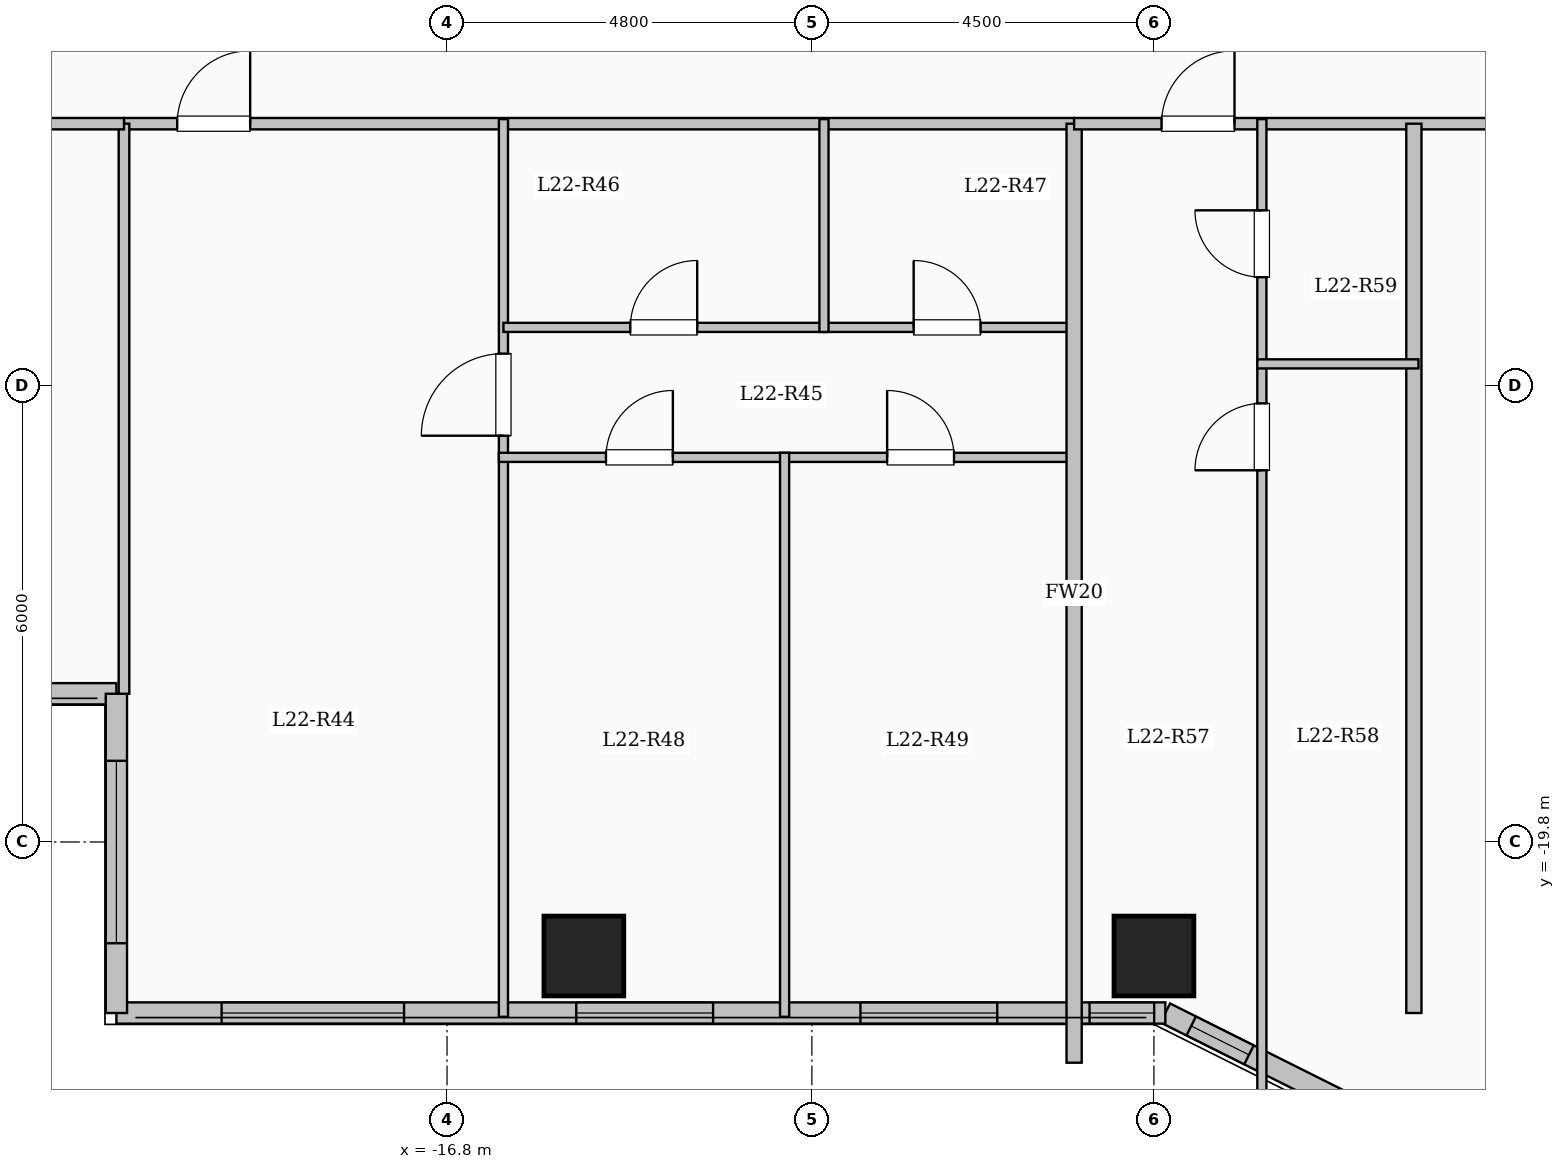
"""IFC4 building model, lengths in metres.
Left out: names, types, materials, properties, quantities, classifications, styles, units other than length and angle.
Written with IfcOpenShell. Run it as: python <this file> out.ifc"""

import sys

from ifc_helpers import new_model, si_unit, direction, frame, frame_2d, origin, origin_2d, place, context, subcontext, project, spatial, rectangle, extrude, element, fill, save


model = new_model("IFC4")
c1 = context("Model", 3, precision=1e-05, world=origin(), true_north=direction((0.0, 1.0)))
c2 = subcontext(c1, "Body", "Model", "MODEL_VIEW")
j1 = project(units=[si_unit("LENGTHUNIT", "METRE"), si_unit("PLANEANGLEUNIT", "RADIAN")], contexts=[c1])
p1 = place(None, origin())
s1 = spatial("IfcSite", under=j1, at=p1, CompositionType="ELEMENT")
p2 = place(p1, origin())
s2 = spatial("IfcBuilding", under=s1, at=p2, CompositionType="ELEMENT")
p3 = place(p2, frame((0.0, 0.0, 85.0)))
s3 = spatial("IfcBuildingStorey", under=s2, at=p3, CompositionType="ELEMENT", Elevation=85.0)
for number, where, z_axis, x_axis in (
    (1, (-15.0, -21.3, 0.0), (0.0, 0.0, 1.0), (1.0, 0.0, 0.0)),
    (2, (-7.5, -21.3, 0.0), (0.0, 0.0, 1.0), (1.0, 0.0, 0.0)),
):
    element("IfcColumn", number, at=place(p3, frame(where, z_axis=z_axis, x_axis=x_axis)), inside=s3, PredefinedType="COLUMN", context=c2, shape_type="SweptSolid", body=[
        extrude(rectangle(XDim=1.05, YDim=1.05, at=origin_2d()), origin(), (0.0, 0.0, 1.0), 3.35),
    ])
p4 = place(p3, frame((-21.15, -17.85, 0.0), z_axis=(0.0, 0.0, 1.0), x_axis=(-1.0, 0.0, 0.0)))
e3 = element("IfcWall", 3, at=p4, inside=s3, PredefinedType="SOLIDWALL", context=c2, shape_type="SweptSolid", body=[
    extrude(rectangle(XDim=5.7, YDim=0.28, at=frame_2d((2.85, 0.0))), origin(), (0.0, 0.0, 1.0), 3.1),
])
p5 = place(p4, frame((1.625, 0.0, 0.9)))
e4 = element("IfcOpeningElement", 4, at=p5, cuts=e3, PredefinedType="OPENING", context=c2, shape_type="SweptSolid", body=[
    extrude(rectangle(XDim=2.4, YDim=1.8, at=frame_2d((1.2, 0.9))), frame((0.0, 0.15, 0.0), z_axis=(0.0, -1.0, 0.0), x_axis=(1.0, 0.0, 0.0)), (0.0, 0.0, 1.0), 0.3),
])
p6 = place(p3, frame((-4.35, -23.55, 0.0), z_axis=(0.0, 0.0, 1.0), x_axis=(-0.894427191, 0.4472135955, 0.0)))
e5 = element("IfcWall", 5, at=p6, inside=s3, PredefinedType="SOLIDWALL", context=c2, shape_type="SweptSolid", body=[
    extrude(rectangle(XDim=3.354, YDim=0.28, at=frame_2d((1.677, 0.0))), origin(), (0.0, 0.0, 1.0), 3.1),
])
p7 = place(p6, frame((2.124, 0.0, 0.95)))
e6 = element("IfcOpeningElement", 6, at=p7, cuts=e5, PredefinedType="OPENING", context=c2, shape_type="SweptSolid", body=[
    extrude(rectangle(XDim=0.85, YDim=1.5, at=frame_2d((0.425, 0.75))), frame((0.0, 0.15, 0.0), z_axis=(0.0, -1.0, 0.0), x_axis=(1.0, 0.0, 0.0)), (0.0, 0.0, 1.0), 0.3),
])
p8 = place(p3, frame((-7.35, -22.05, 0.0), z_axis=(0.0, 0.0, 1.0), x_axis=(-1.0, 0.0, 0.0)))
e7 = element("IfcWall", 7, at=p8, inside=s3, PredefinedType="SOLIDWALL", context=c2, shape_type="SweptSolid", body=[
    extrude(rectangle(XDim=13.8, YDim=0.28, at=frame_2d((6.9, 0.0))), origin(), (0.0, 0.0, 1.0), 3.1),
])
p9 = place(p8, frame((0.147, 0.0, 0.95)))
e8 = element("IfcOpeningElement", 8, at=p9, cuts=e7, PredefinedType="OPENING", context=c2, shape_type="SweptSolid", body=[
    extrude(rectangle(XDim=0.85, YDim=1.5, at=frame_2d((0.425, 0.75))), frame((0.0, 0.15, 0.0), z_axis=(0.0, -1.0, 0.0), x_axis=(1.0, 0.0, 0.0)), (0.0, 0.0, 1.0), 0.3),
])
p10 = place(p8, frame((2.211, 0.0, 0.9)))
e9 = element("IfcOpeningElement", 9, at=p10, cuts=e7, PredefinedType="OPENING", context=c2, shape_type="SweptSolid", body=[
    extrude(rectangle(XDim=1.8, YDim=1.65, at=frame_2d((0.9, 0.825))), frame((0.0, 0.15, 0.0), z_axis=(0.0, -1.0, 0.0), x_axis=(1.0, 0.0, 0.0)), (0.0, 0.0, 1.0), 0.3),
])
p11 = place(p8, frame((5.95, 0.0, 0.9)))
e10 = element("IfcOpeningElement", 10, at=p11, cuts=e7, PredefinedType="OPENING", context=c2, shape_type="SweptSolid", body=[
    extrude(rectangle(XDim=1.8, YDim=1.65, at=frame_2d((0.9, 0.825))), frame((0.0, 0.15, 0.0), z_axis=(0.0, -1.0, 0.0), x_axis=(1.0, 0.0, 0.0)), (0.0, 0.0, 1.0), 0.3),
])
p12 = place(p8, frame((10.016, 0.0, 0.9)))
e11 = element("IfcOpeningElement", 11, at=p12, cuts=e7, PredefinedType="OPENING", context=c2, shape_type="SweptSolid", body=[
    extrude(rectangle(XDim=2.4, YDim=1.8, at=frame_2d((1.2, 0.9))), frame((0.0, 0.15, 0.0), z_axis=(0.0, -1.0, 0.0), x_axis=(1.0, 0.0, 0.0)), (0.0, 0.0, 1.0), 0.3),
])
p13 = place(p3, frame((-21.15, -22.05, 0.0), z_axis=(0.0, 0.0, 1.0), x_axis=(0.0, 1.0, 0.0)))
e12 = element("IfcWall", 12, at=p13, inside=s3, PredefinedType="SOLIDWALL", context=c2, shape_type="SweptSolid", body=[
    extrude(rectangle(XDim=4.2, YDim=0.28, at=frame_2d((2.1, 0.0))), origin(), (0.0, 0.0, 1.0), 3.1),
])
p14 = place(p13, frame((0.918, 0.0, 0.9)))
e13 = element("IfcOpeningElement", 13, at=p14, cuts=e12, PredefinedType="OPENING", context=c2, shape_type="SweptSolid", body=[
    extrude(rectangle(XDim=2.4, YDim=1.8, at=frame_2d((1.2, 0.9))), frame((0.0, 0.15, 0.0), z_axis=(0.0, -1.0, 0.0), x_axis=(1.0, 0.0, 0.0)), (0.0, 0.0, 1.0), 0.3),
])
p15 = place(p3, frame((-21.05, -10.35, 0.0), z_axis=(0.0, 0.0, 1.0), x_axis=(1.0, 0.0, 0.0)))
e14 = element("IfcWall", 14, at=p15, inside=s3, PredefinedType="PARTITIONING", context=c2, shape_type="SweptSolid", body=[
    extrude(rectangle(XDim=12.5, YDim=0.15, at=frame_2d((6.25, 0.0))), origin(), (0.0, 0.0, 1.0), 3.1),
])
p16 = place(p15, frame((0.7, 0.0, 0.0)))
e15 = element("IfcOpeningElement", 15, at=p16, cuts=e14, PredefinedType="OPENING", context=c2, shape_type="SweptSolid", body=[
    extrude(rectangle(XDim=0.96, YDim=2.15, at=frame_2d((0.48, 1.075))), frame((0.0, 0.085, 0.0), z_axis=(0.0, -1.0, 0.0), x_axis=(1.0, 0.0, 0.0)), (0.0, 0.0, 1.0), 0.17),
])
p17 = place(p3, frame((-16.058, -22.1, 0.0), z_axis=(0.0, 0.0, 1.0), x_axis=(0.0, 1.0, 0.0)))
e16 = element("IfcWall", 16, at=p17, inside=s3, PredefinedType="PARTITIONING", context=c2, shape_type="SweptSolid", body=[
    extrude(rectangle(XDim=11.81, YDim=0.12, at=frame_2d((5.905, 0.0))), origin(), (0.0, 0.0, 1.0), 3.1),
])
p18 = place(p17, frame((7.645, 0.0, 0.0)))
e17 = element("IfcOpeningElement", 17, at=p18, cuts=e16, PredefinedType="OPENING", context=c2, shape_type="SweptSolid", body=[
    extrude(rectangle(XDim=1.08, YDim=2.15, at=frame_2d((0.54, 1.075))), frame((0.0, 0.07, 0.0), z_axis=(0.0, -1.0, 0.0), x_axis=(1.0, 0.0, 0.0)), (0.0, 0.0, 1.0), 0.14),
])
p19 = place(p3, frame((-16.058, -13.03, 0.0), z_axis=(0.0, 0.0, 1.0), x_axis=(1.0, 0.0, 0.0)))
e18 = element("IfcWall", 18, at=p19, inside=s3, PredefinedType="PARTITIONING", context=c2, shape_type="SweptSolid", body=[
    extrude(rectangle(XDim=4.217, YDim=0.12, at=frame_2d((2.108, 0.0))), origin(), (0.0, 0.0, 1.0), 3.1),
])
p20 = place(p19, frame((1.669, 0.0, 0.0)))
e19 = element("IfcOpeningElement", 19, at=p20, cuts=e18, PredefinedType="OPENING", context=c2, shape_type="SweptSolid", body=[
    extrude(rectangle(XDim=0.88, YDim=2.1, at=frame_2d((0.44, 1.05))), frame((0.0, 0.07, 0.0), z_axis=(0.0, -1.0, 0.0), x_axis=(1.0, 0.0, 0.0)), (0.0, 0.0, 1.0), 0.14),
])
p21 = place(p3, frame((-11.841, -13.03, 0.0), z_axis=(0.0, 0.0, 1.0), x_axis=(1.0, 0.0, 0.0)))
e20 = element("IfcWall", 20, at=p21, inside=s3, PredefinedType="PARTITIONING", context=c2, shape_type="SweptSolid", body=[
    extrude(rectangle(XDim=3.241, YDim=0.12, at=frame_2d((1.621, 0.0))), origin(), (0.0, 0.0, 1.0), 3.1),
])
p22 = place(p21, frame((1.18, 0.0, 0.0)))
e21 = element("IfcOpeningElement", 21, at=p22, cuts=e20, PredefinedType="OPENING", context=c2, shape_type="SweptSolid", body=[
    extrude(rectangle(XDim=0.88, YDim=2.1, at=frame_2d((0.44, 1.05))), frame((0.0, 0.07, 0.0), z_axis=(0.0, -1.0, 0.0), x_axis=(1.0, 0.0, 0.0)), (0.0, 0.0, 1.0), 0.14),
])
p23 = place(p3, frame((-16.118, -14.74, 0.0), z_axis=(0.0, 0.0, 1.0), x_axis=(1.0, 0.0, 0.0)))
e22 = element("IfcWall", 22, at=p23, inside=s3, PredefinedType="PARTITIONING", context=c2, shape_type="SweptSolid", body=[
    extrude(rectangle(XDim=7.578, YDim=0.12, at=frame_2d((3.789, 0.0))), origin(), (0.0, 0.0, 1.0), 3.1),
])
p24 = place(p23, frame((1.409, 0.0, 0.0)))
e23 = element("IfcOpeningElement", 23, at=p24, cuts=e22, PredefinedType="OPENING", context=c2, shape_type="SweptSolid", body=[
    extrude(rectangle(XDim=0.88, YDim=2.1, at=frame_2d((0.44, 1.05))), frame((0.0, 0.07, 0.0), z_axis=(0.0, -1.0, 0.0), x_axis=(1.0, 0.0, 0.0)), (0.0, 0.0, 1.0), 0.14),
])
p25 = place(p23, frame((5.108, 0.0, 0.0)))
e24 = element("IfcOpeningElement", 24, at=p25, cuts=e22, PredefinedType="OPENING", context=c2, shape_type="SweptSolid", body=[
    extrude(rectangle(XDim=0.88, YDim=2.1, at=frame_2d((0.44, 1.05))), frame((0.0, 0.07, 0.0), z_axis=(0.0, -1.0, 0.0), x_axis=(1.0, 0.0, 0.0)), (0.0, 0.0, 1.0), 0.14),
])
p26 = place(p3, frame((-11.841, -13.09, 0.0), z_axis=(0.0, 0.0, 1.0), x_axis=(0.0, 1.0, 0.0)))
e25 = element("IfcWall", 25, at=p26, inside=s3, PredefinedType="PARTITIONING", context=c2, shape_type="SweptSolid", body=[
    extrude(rectangle(XDim=2.8, YDim=0.12, at=frame_2d((1.4, 0.0))), origin(), (0.0, 0.0, 1.0), 3.1),
])
p27 = place(p3, frame((-12.359, -22.1, 0.0), z_axis=(0.0, 0.0, 1.0), x_axis=(0.0, 1.0, 0.0)))
e26 = element("IfcWall", 26, at=p27, inside=s3, PredefinedType="PARTITIONING", context=c2, shape_type="SweptSolid", body=[
    extrude(rectangle(XDim=7.42, YDim=0.12, at=frame_2d((3.71, 0.0))), origin(), (0.0, 0.0, 1.0), 3.1),
])
p28 = place(p3, frame((-8.55, -22.704, 0.0), z_axis=(0.0, 0.0, 1.0), x_axis=(0.0, 1.0, 0.0)))
e27 = element("IfcWall", 27, at=p28, inside=s3, PredefinedType="SOLIDWALL", context=c2, shape_type="SweptSolid", body=[
    extrude(rectangle(XDim=12.354, YDim=0.2, at=frame_2d((6.177, 0.0))), origin(), (0.0, 0.0, 1.0), 3.1),
])
p29 = place(p3, frame((-8.55, -10.35, 0.0), z_axis=(0.0, 0.0, 1.0), x_axis=(1.0, 0.0, 0.0)))
e28 = element("IfcWall", 28, at=p29, inside=s3, PredefinedType="PARTITIONING", context=c2, shape_type="SweptSolid", body=[
    extrude(rectangle(XDim=17.1, YDim=0.15, at=frame_2d((8.55, 0.0))), origin(), (0.0, 0.0, 1.0), 3.1),
])
p30 = place(p29, frame((1.15, 0.0, 0.0)))
e29 = element("IfcOpeningElement", 29, at=p30, cuts=e28, PredefinedType="OPENING", context=c2, shape_type="SweptSolid", body=[
    extrude(rectangle(XDim=0.96, YDim=2.15, at=frame_2d((0.48, 1.075))), frame((0.0, 0.085, 0.0), z_axis=(0.0, -1.0, 0.0), x_axis=(1.0, 0.0, 0.0)), (0.0, 0.0, 1.0), 0.17),
])
p31 = place(p29, frame((10.5, 0.0, 0.0)))
e30 = element("IfcOpeningElement", 30, at=p31, cuts=e28, PredefinedType="OPENING", context=c2, shape_type="SweptSolid", body=[
    extrude(rectangle(XDim=0.96, YDim=2.15, at=frame_2d((0.48, 1.075))), frame((0.0, 0.085, 0.0), z_axis=(0.0, -1.0, 0.0), x_axis=(1.0, 0.0, 0.0)), (0.0, 0.0, 1.0), 0.17),
])
p32 = place(p3, frame((-4.08, -22.05, 0.0), z_axis=(0.0, 0.0, 1.0), x_axis=(0.0, 1.0, 0.0)))
e31 = element("IfcWall", 31, at=p32, inside=s3, PredefinedType="SOLIDWALL", context=c2, shape_type="SweptSolid", body=[
    extrude(rectangle(XDim=11.7, YDim=0.2, at=frame_2d((5.85, 0.0))), origin(), (0.0, 0.0, 1.0), 3.1),
])
p33 = place(p3, frame((-6.08, -23.314, 0.0), z_axis=(0.0, 0.0, 1.0), x_axis=(0.0, 1.0, 0.0)))
e32 = element("IfcWall", 32, at=p33, inside=s3, PredefinedType="PARTITIONING", context=c2, shape_type="SweptSolid", body=[
    extrude(rectangle(XDim=9.804, YDim=0.12, at=frame_2d((4.902, 0.0))), origin(), (0.0, 0.0, 1.0), 3.1),
])
p34 = place(p33, frame((8.404, 0.0, 0.0)))
e33 = element("IfcOpeningElement", 33, at=p34, cuts=e32, PredefinedType="OPENING", context=c2, shape_type="SweptSolid", body=[
    extrude(rectangle(XDim=0.88, YDim=2.1, at=frame_2d((0.44, 1.05))), frame((0.0, 0.07, 0.0), z_axis=(0.0, -1.0, 0.0), x_axis=(1.0, 0.0, 0.0)), (0.0, 0.0, 1.0), 0.14),
])
p35 = place(p3, frame((-6.08, -13.51, 0.0), z_axis=(0.0, 0.0, 1.0), x_axis=(0.0, 1.0, 0.0)))
e34 = element("IfcWall", 34, at=p35, inside=s3, PredefinedType="PARTITIONING", context=c2, shape_type="SweptSolid", body=[
    extrude(rectangle(XDim=3.22, YDim=0.12, at=frame_2d((1.61, 0.0))), origin(), (0.0, 0.0, 1.0), 3.1),
])
p36 = place(p35, frame((1.14, 0.0, 0.0)))
e35 = element("IfcOpeningElement", 35, at=p36, cuts=e34, PredefinedType="OPENING", context=c2, shape_type="SweptSolid", body=[
    extrude(rectangle(XDim=0.88, YDim=2.1, at=frame_2d((0.44, 1.05))), frame((0.0, 0.07, 0.0), z_axis=(0.0, -1.0, 0.0), x_axis=(1.0, 0.0, 0.0)), (0.0, 0.0, 1.0), 0.14),
])
p37 = place(p3, frame((-6.14, -13.51, 0.0), z_axis=(0.0, 0.0, 1.0), x_axis=(1.0, 0.0, 0.0)))
e36 = element("IfcWall", 36, at=p37, inside=s3, PredefinedType="PARTITIONING", context=c2, shape_type="SweptSolid", body=[
    extrude(rectangle(XDim=2.12, YDim=0.12, at=frame_2d((1.06, 0.0))), origin(), (0.0, 0.0, 1.0), 3.1),
])
p38 = place(p3, frame((-21.05, -17.85, 0.0), z_axis=(0.0, 0.0, 1.0), x_axis=(0.0, 1.0, 0.0)))
e37 = element("IfcWall", 37, at=p38, inside=s3, PredefinedType="PARTITIONING", context=c2, shape_type="SweptSolid", body=[
    extrude(rectangle(XDim=7.5, YDim=0.14, at=frame_2d((3.75, 0.0))), origin(), (0.0, 0.0, 1.0), 3.1),
])
p39 = place(p3, frame((-26.88, -10.35, 0.0), z_axis=(0.0, 0.0, 1.0), x_axis=(1.0, 0.0, 0.0)))
e38 = element("IfcWall", 38, at=p39, inside=s3, PredefinedType="PARTITIONING", context=c2, shape_type="SweptSolid", body=[
    extrude(rectangle(XDim=5.83, YDim=0.15, at=frame_2d((2.915, 0.0))), origin(), (0.0, 0.0, 1.0), 3.1),
])
p40 = place(p39, frame((2.44, 0.0, 0.0)))
e39 = element("IfcOpeningElement", 39, at=p40, cuts=e38, PredefinedType="OPENING", context=c2, shape_type="SweptSolid", body=[
    extrude(rectangle(XDim=0.95, YDim=2.15, at=frame_2d((0.475, 1.075))), frame((0.0, 0.085, 0.0), z_axis=(0.0, -1.0, 0.0), x_axis=(1.0, 0.0, 0.0)), (0.0, 0.0, 1.0), 0.17),
])
p41 = place(p7, origin())
e40 = element("IfcWindow", 40, at=p41, inside=s3, PartitioningType="SINGLE_PANEL", PredefinedType="WINDOW", context=c2, shape_type="SweptSolid", body=[
    extrude(rectangle(XDim=0.85, YDim=1.5, at=frame_2d((0.425, 0.75))), frame((0.0, 0.03, 0.0), z_axis=(0.0, -1.0, 0.0), x_axis=(1.0, 0.0, 0.0)), (0.0, 0.0, 1.0), 0.06),
])
fill(e6, e40)
p42 = place(p9, origin())
e41 = element("IfcWindow", 41, at=p42, inside=s3, PartitioningType="SINGLE_PANEL", PredefinedType="WINDOW", context=c2, shape_type="SweptSolid", body=[
    extrude(rectangle(XDim=0.85, YDim=1.5, at=frame_2d((0.425, 0.75))), frame((0.0, 0.03, 0.0), z_axis=(0.0, -1.0, 0.0), x_axis=(1.0, 0.0, 0.0)), (0.0, 0.0, 1.0), 0.06),
])
fill(e8, e41)
p43 = place(p10, origin())
e42 = element("IfcWindow", 42, at=p43, inside=s3, PartitioningType="SINGLE_PANEL", PredefinedType="WINDOW", context=c2, shape_type="SweptSolid", body=[
    extrude(rectangle(XDim=1.8, YDim=1.65, at=frame_2d((0.9, 0.825))), frame((0.0, 0.03, 0.0), z_axis=(0.0, -1.0, 0.0), x_axis=(1.0, 0.0, 0.0)), (0.0, 0.0, 1.0), 0.06),
])
fill(e9, e42)
p44 = place(p11, origin())
e43 = element("IfcWindow", 43, at=p44, inside=s3, PartitioningType="SINGLE_PANEL", PredefinedType="WINDOW", context=c2, shape_type="SweptSolid", body=[
    extrude(rectangle(XDim=1.8, YDim=1.65, at=frame_2d((0.9, 0.825))), frame((0.0, 0.03, 0.0), z_axis=(0.0, -1.0, 0.0), x_axis=(1.0, 0.0, 0.0)), (0.0, 0.0, 1.0), 0.06),
])
fill(e10, e43)
p45 = place(p12, origin())
e44 = element("IfcWindow", 44, at=p45, inside=s3, PartitioningType="SINGLE_PANEL", PredefinedType="WINDOW", context=c2, shape_type="SweptSolid", body=[
    extrude(rectangle(XDim=2.4, YDim=1.8, at=frame_2d((1.2, 0.9))), frame((0.0, 0.03, 0.0), z_axis=(0.0, -1.0, 0.0), x_axis=(1.0, 0.0, 0.0)), (0.0, 0.0, 1.0), 0.06),
])
fill(e11, e44)
p46 = place(p14, origin())
e45 = element("IfcWindow", 45, at=p46, inside=s3, PartitioningType="SINGLE_PANEL", PredefinedType="WINDOW", context=c2, shape_type="SweptSolid", body=[
    extrude(rectangle(XDim=2.4, YDim=1.8, at=frame_2d((1.2, 0.9))), frame((0.0, 0.03, 0.0), z_axis=(0.0, -1.0, 0.0), x_axis=(1.0, 0.0, 0.0)), (0.0, 0.0, 1.0), 0.06),
])
fill(e13, e45)
p47 = place(p16, origin())
e46 = element("IfcDoor", 46, at=p47, inside=s3, OperationType="SINGLE_SWING_RIGHT", PredefinedType="DOOR", context=c2, shape_type="SweptSolid", body=[
    extrude(rectangle(XDim=0.96, YDim=2.15, at=frame_2d((0.48, 1.075))), frame((0.0, 0.025, 0.0), z_axis=(0.0, -1.0, 0.0), x_axis=(1.0, 0.0, 0.0)), (0.0, 0.0, 1.0), 0.05),
])
fill(e15, e46)
p48 = place(p18, origin())
e47 = element("IfcDoor", 47, at=p48, inside=s3, OperationType="SINGLE_SWING_LEFT", PredefinedType="DOOR", context=c2, shape_type="SweptSolid", body=[
    extrude(rectangle(XDim=1.08, YDim=2.15, at=frame_2d((0.54, 1.075))), frame((0.0, 0.025, 0.0), z_axis=(0.0, -1.0, 0.0), x_axis=(1.0, 0.0, 0.0)), (0.0, 0.0, 1.0), 0.05),
])
fill(e17, e47)
p49 = place(p20, origin())
e48 = element("IfcDoor", 48, at=p49, inside=s3, OperationType="SINGLE_SWING_RIGHT", PredefinedType="DOOR", context=c2, shape_type="SweptSolid", body=[
    extrude(rectangle(XDim=0.88, YDim=2.1, at=frame_2d((0.44, 1.05))), frame((0.0, 0.025, 0.0), z_axis=(0.0, -1.0, 0.0), x_axis=(1.0, 0.0, 0.0)), (0.0, 0.0, 1.0), 0.05),
])
fill(e19, e48)
p50 = place(p22, origin())
e49 = element("IfcDoor", 49, at=p50, inside=s3, OperationType="SINGLE_SWING_LEFT", PredefinedType="DOOR", context=c2, shape_type="SweptSolid", body=[
    extrude(rectangle(XDim=0.88, YDim=2.1, at=frame_2d((0.44, 1.05))), frame((0.0, 0.025, 0.0), z_axis=(0.0, -1.0, 0.0), x_axis=(1.0, 0.0, 0.0)), (0.0, 0.0, 1.0), 0.05),
])
fill(e21, e49)
p51 = place(p24, origin())
e50 = element("IfcDoor", 50, at=p51, inside=s3, OperationType="SINGLE_SWING_RIGHT", PredefinedType="DOOR", context=c2, shape_type="SweptSolid", body=[
    extrude(rectangle(XDim=0.88, YDim=2.1, at=frame_2d((0.44, 1.05))), frame((0.0, 0.025, 0.0), z_axis=(0.0, -1.0, 0.0), x_axis=(1.0, 0.0, 0.0)), (0.0, 0.0, 1.0), 0.05),
])
fill(e23, e50)
p52 = place(p25, origin())
e51 = element("IfcDoor", 51, at=p52, inside=s3, OperationType="SINGLE_SWING_LEFT", PredefinedType="DOOR", context=c2, shape_type="SweptSolid", body=[
    extrude(rectangle(XDim=0.88, YDim=2.1, at=frame_2d((0.44, 1.05))), frame((0.0, 0.025, 0.0), z_axis=(0.0, -1.0, 0.0), x_axis=(1.0, 0.0, 0.0)), (0.0, 0.0, 1.0), 0.05),
])
fill(e24, e51)
p53 = place(p30, origin())
e52 = element("IfcDoor", 52, at=p53, inside=s3, OperationType="SINGLE_SWING_RIGHT", PredefinedType="DOOR", context=c2, shape_type="SweptSolid", body=[
    extrude(rectangle(XDim=0.96, YDim=2.15, at=frame_2d((0.48, 1.075))), frame((0.0, 0.025, 0.0), z_axis=(0.0, -1.0, 0.0), x_axis=(1.0, 0.0, 0.0)), (0.0, 0.0, 1.0), 0.05),
])
fill(e29, e52)
p54 = place(p34, origin())
e53 = element("IfcDoor", 53, at=p54, inside=s3, OperationType="SINGLE_SWING_LEFT", PredefinedType="DOOR", context=c2, shape_type="SweptSolid", body=[
    extrude(rectangle(XDim=0.88, YDim=2.1, at=frame_2d((0.44, 1.05))), frame((0.0, 0.025, 0.0), z_axis=(0.0, -1.0, 0.0), x_axis=(1.0, 0.0, 0.0)), (0.0, 0.0, 1.0), 0.05),
])
fill(e33, e53)
p55 = place(p36, origin())
e54 = element("IfcDoor", 54, at=p55, inside=s3, OperationType="SINGLE_SWING_RIGHT", PredefinedType="DOOR", context=c2, shape_type="SweptSolid", body=[
    extrude(rectangle(XDim=0.88, YDim=2.1, at=frame_2d((0.44, 1.05))), frame((0.0, 0.025, 0.0), z_axis=(0.0, -1.0, 0.0), x_axis=(1.0, 0.0, 0.0)), (0.0, 0.0, 1.0), 0.05),
])
fill(e35, e54)
save(model, sys.argv[1])
